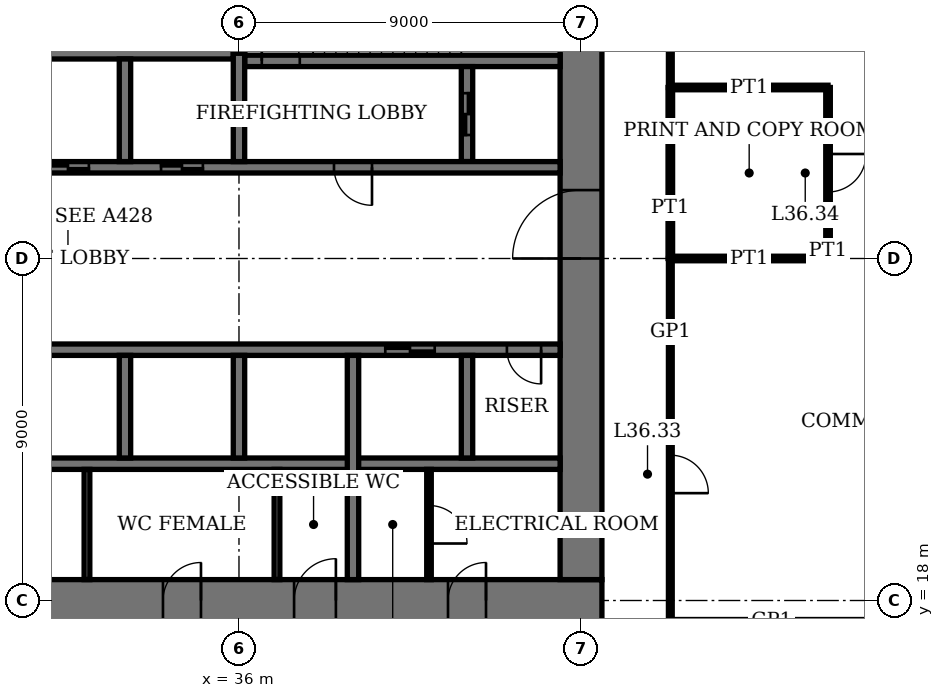
"""IFC4 building model, lengths in metres.
Left out: names, types, materials, properties, quantities, classifications, styles, units other than length and angle.
Written with IfcOpenShell. Run it as: python <this file> out.ifc"""

import sys

from ifc_helpers import new_model, si_unit, direction, frame, frame_2d, origin, place, context, subcontext, project, spatial, rectangle, extrude, element, fill, save


model = new_model("IFC4")
c1 = context("Model", 3, precision=1e-05, world=origin(), true_north=direction((0.0, 1.0)))
c2 = subcontext(c1, "Body", "Model", "MODEL_VIEW")
j1 = project(units=[si_unit("LENGTHUNIT", "METRE"), si_unit("PLANEANGLEUNIT", "RADIAN")], contexts=[c1])
p1 = place(None, origin())
s1 = spatial("IfcSite", under=j1, at=p1, CompositionType="ELEMENT")
p2 = place(p1, origin())
s2 = spatial("IfcBuilding", under=s1, at=p2, CompositionType="ELEMENT")
p3 = place(p2, frame((0.0, 0.0, 149.0)))
s3 = spatial("IfcBuildingStorey", under=s2, at=p3, CompositionType="ELEMENT", Elevation=149.0)
p4 = place(p3, frame((17.45, 18.0, 0.0), z_axis=(0.0, 0.0, 1.0), x_axis=(1.0, 0.0, 0.0)))
e1 = element("IfcWall", 1, at=p4, inside=s3, PredefinedType="SHEAR", context=c2, shape_type="SweptSolid", body=[
    extrude(rectangle(XDim=28.1, YDim=1.1, at=frame_2d((14.05, 0.0))), origin(), (0.0, 0.0, 1.0), 4.0),
])
p5 = place(p4, frame((11.55, 0.0, 0.0)))
e2 = element("IfcOpeningElement", 2, at=p5, cuts=e1, PredefinedType="OPENING", context=c2, shape_type="SweptSolid", body=[
    extrude(rectangle(XDim=1.0, YDim=2.4, at=frame_2d((0.5, 1.2))), frame((0.0, 0.56, 0.0), z_axis=(0.0, -1.0, 0.0), x_axis=(1.0, 0.0, 0.0)), (0.0, 0.0, 1.0), 1.12),
])
p6 = place(p4, frame((16.55, 0.0, 0.0)))
e3 = element("IfcOpeningElement", 3, at=p6, cuts=e1, PredefinedType="OPENING", context=c2, shape_type="SweptSolid", body=[
    extrude(rectangle(XDim=1.0, YDim=2.4, at=frame_2d((0.5, 1.2))), frame((0.0, 0.56, 0.0), z_axis=(0.0, -1.0, 0.0), x_axis=(1.0, 0.0, 0.0)), (0.0, 0.0, 1.0), 1.12),
])
p7 = place(p4, frame((20.0, 0.0, 0.0)))
e4 = element("IfcOpeningElement", 4, at=p7, cuts=e1, PredefinedType="OPENING", context=c2, shape_type="SweptSolid", body=[
    extrude(rectangle(XDim=1.1, YDim=2.4, at=frame_2d((0.55, 1.2))), frame((0.0, 0.56, 0.0), z_axis=(0.0, -1.0, 0.0), x_axis=(1.0, 0.0, 0.0)), (0.0, 0.0, 1.0), 1.12),
])
p8 = place(p4, frame((24.05, 0.0, 0.0)))
e5 = element("IfcOpeningElement", 5, at=p8, cuts=e1, PredefinedType="OPENING", context=c2, shape_type="SweptSolid", body=[
    extrude(rectangle(XDim=1.0, YDim=2.4, at=frame_2d((0.5, 1.2))), frame((0.0, 0.56, 0.0), z_axis=(0.0, -1.0, 0.0), x_axis=(1.0, 0.0, 0.0)), (0.0, 0.0, 1.0), 1.12),
])
p9 = place(p3, frame((45.0, 18.55, 0.0), z_axis=(0.0, 0.0, 1.0), x_axis=(0.0, 1.0, 0.0)))
e6 = element("IfcWall", 6, at=p9, inside=s3, PredefinedType="SHEAR", context=c2, shape_type="SweptSolid", body=[
    extrude(rectangle(XDim=16.9, YDim=1.1, at=frame_2d((8.45, 0.0))), origin(), (0.0, 0.0, 1.0), 4.0),
])
p10 = place(p9, frame((8.45, 0.0, 0.0)))
e7 = element("IfcOpeningElement", 7, at=p10, cuts=e6, PredefinedType="OPENING", context=c2, shape_type="SweptSolid", body=[
    extrude(rectangle(XDim=1.8, YDim=2.4, at=frame_2d((0.9, 1.2))), frame((0.0, 0.56, 0.0), z_axis=(0.0, -1.0, 0.0), x_axis=(1.0, 0.0, 0.0)), (0.0, 0.0, 1.0), 1.12),
])
p11 = place(p3, frame((36.15, 32.2, 0.0), z_axis=(0.0, 0.0, 1.0), x_axis=(1.0, 0.0, 0.0)))
e8 = element("IfcWall", 8, at=p11, inside=s3, PredefinedType="SHEAR", context=c2, shape_type="SweptSolid", body=[
    extrude(rectangle(XDim=8.3, YDim=0.3, at=frame_2d((4.15, 0.0))), origin(), (0.0, 0.0, 1.0), 4.0),
])
p12 = place(p11, frame((0.45, 0.0, 0.0)))
e9 = element("IfcOpeningElement", 9, at=p12, cuts=e8, PredefinedType="OPENING", context=c2, shape_type="SweptSolid", body=[
    extrude(rectangle(XDim=1.0, YDim=2.4, at=frame_2d((0.5, 1.2))), frame((0.0, 0.16, 0.0), z_axis=(0.0, -1.0, 0.0), x_axis=(1.0, 0.0, 0.0)), (0.0, 0.0, 1.0), 0.32),
])
p13 = place(p3, frame((36.0, 32.4, 0.0), z_axis=(0.0, 0.0, 1.0), x_axis=(0.0, 1.0, 0.0)))
e10 = element("IfcWall", 10, at=p13, inside=s3, PredefinedType="SHEAR", context=c2, shape_type="SweptSolid", body=[
    extrude(rectangle(XDim=3.05, YDim=0.3, at=frame_2d((1.525, 0.0))), origin(), (0.0, 0.0, 1.0), 4.0),
])
p14 = place(p3, frame((42.0, 29.55, 0.0), z_axis=(0.0, 0.0, 1.0), x_axis=(0.0, 1.0, 0.0)))
e11 = element("IfcWall", 11, at=p14, inside=s3, PredefinedType="SHEAR", context=c2, shape_type="SweptSolid", body=[
    extrude(rectangle(XDim=2.5, YDim=0.3, at=frame_2d((1.25, 0.0))), origin(), (0.0, 0.0, 1.0), 4.0),
])
p15 = place(p14, frame((0.7, 0.0, 0.0)))
e12 = element("IfcOpeningElement", 12, at=p15, cuts=e11, PredefinedType="OPENING", context=c2, shape_type="SweptSolid", body=[
    extrude(rectangle(XDim=1.1, YDim=2.4, at=frame_2d((0.55, 1.2))), frame((0.0, 0.16, 0.0), z_axis=(0.0, -1.0, 0.0), x_axis=(1.0, 0.0, 0.0)), (0.0, 0.0, 1.0), 0.32),
])
p16 = place(p3, frame((18.55, 24.6, 0.0), z_axis=(0.0, 0.0, 1.0), x_axis=(1.0, 0.0, 0.0)))
e13 = element("IfcWall", 13, at=p16, inside=s3, PredefinedType="SHEAR", context=c2, shape_type="SweptSolid", body=[
    extrude(rectangle(XDim=25.9, YDim=0.3, at=frame_2d((12.95, 0.0))), origin(), (0.0, 0.0, 1.0), 4.0),
])
p17 = place(p16, frame((4.95, 0.0, 0.0)))
e14 = element("IfcOpeningElement", 14, at=p17, cuts=e13, PredefinedType="OPENING", context=c2, shape_type="SweptSolid", body=[
    extrude(rectangle(XDim=1.0, YDim=2.4, at=frame_2d((0.5, 1.2))), frame((0.0, 0.16, 0.0), z_axis=(0.0, -1.0, 0.0), x_axis=(1.0, 0.0, 0.0)), (0.0, 0.0, 1.0), 0.32),
])
p18 = place(p16, frame((24.5, 0.0, 0.0)))
e15 = element("IfcOpeningElement", 15, at=p18, cuts=e13, PredefinedType="OPENING", context=c2, shape_type="SweptSolid", body=[
    extrude(rectangle(XDim=0.9, YDim=2.1, at=frame_2d((0.45, 1.05))), frame((0.0, 0.16, 0.0), z_axis=(0.0, -1.0, 0.0), x_axis=(1.0, 0.0, 0.0)), (0.0, 0.0, 1.0), 0.32),
])
p19 = place(p16, frame((21.3, 0.0, 0.0)))
e16 = element("IfcOpeningElement", 16, at=p19, cuts=e13, PredefinedType="OPENING", context=c2, shape_type="SweptSolid", body=[
    extrude(rectangle(XDim=1.3, YDim=2.4, at=frame_2d((0.65, 1.2))), frame((0.0, 0.16, 0.0), z_axis=(0.0, -1.0, 0.0), x_axis=(1.0, 0.0, 0.0)), (0.0, 0.0, 1.0), 0.32),
])
p20 = place(p3, frame((18.55, 29.4, 0.0), z_axis=(0.0, 0.0, 1.0), x_axis=(1.0, 0.0, 0.0)))
e17 = element("IfcWall", 17, at=p20, inside=s3, PredefinedType="SHEAR", context=c2, shape_type="SweptSolid", body=[
    extrude(rectangle(XDim=25.9, YDim=0.3, at=frame_2d((12.95, 0.0))), origin(), (0.0, 0.0, 1.0), 4.0),
])
p21 = place(p20, frame((19.95, 0.0, 0.0)))
e18 = element("IfcOpeningElement", 18, at=p21, cuts=e17, PredefinedType="OPENING", context=c2, shape_type="SweptSolid", body=[
    extrude(rectangle(XDim=1.0, YDim=2.4, at=frame_2d((0.5, 1.2))), frame((0.0, 0.16, 0.0), z_axis=(0.0, -1.0, 0.0), x_axis=(1.0, 0.0, 0.0)), (0.0, 0.0, 1.0), 0.32),
])
p22 = place(p20, frame((0.5, 0.0, 0.0)))
e19 = element("IfcOpeningElement", 19, at=p22, cuts=e17, PredefinedType="OPENING", context=c2, shape_type="SweptSolid", body=[
    extrude(rectangle(XDim=0.9, YDim=2.1, at=frame_2d((0.45, 1.05))), frame((0.0, 0.16, 0.0), z_axis=(0.0, -1.0, 0.0), x_axis=(1.0, 0.0, 0.0)), (0.0, 0.0, 1.0), 0.32),
])
p23 = place(p20, frame((15.4, 0.0, 0.0)))
e20 = element("IfcOpeningElement", 20, at=p23, cuts=e17, PredefinedType="OPENING", context=c2, shape_type="SweptSolid", body=[
    extrude(rectangle(XDim=1.1, YDim=2.4, at=frame_2d((0.55, 1.2))), frame((0.0, 0.16, 0.0), z_axis=(0.0, -1.0, 0.0), x_axis=(1.0, 0.0, 0.0)), (0.0, 0.0, 1.0), 0.32),
])
p24 = place(p20, frame((12.4, 0.0, 0.0)))
e21 = element("IfcOpeningElement", 21, at=p24, cuts=e17, PredefinedType="OPENING", context=c2, shape_type="SweptSolid", body=[
    extrude(rectangle(XDim=1.1, YDim=2.4, at=frame_2d((0.55, 1.2))), frame((0.0, 0.16, 0.0), z_axis=(0.0, -1.0, 0.0), x_axis=(1.0, 0.0, 0.0)), (0.0, 0.0, 1.0), 0.32),
])
p25 = place(p20, frame((3.3, 0.0, 0.0)))
e22 = element("IfcOpeningElement", 22, at=p25, cuts=e17, PredefinedType="OPENING", context=c2, shape_type="SweptSolid", body=[
    extrude(rectangle(XDim=1.3, YDim=2.4, at=frame_2d((0.65, 1.2))), frame((0.0, 0.16, 0.0), z_axis=(0.0, -1.0, 0.0), x_axis=(1.0, 0.0, 0.0)), (0.0, 0.0, 1.0), 0.32),
])
for number, where, z_axis, x_axis in (
    (23, (27.15, 21.6, 0.0), (0.0, 0.0, 1.0), (1.0, 0.0, 0.0)),
    (24, (18.55, 32.4, 0.0), (0.0, 0.0, 1.0), (1.0, 0.0, 0.0)),
):
    element("IfcWall", number, at=place(p3, frame(where, z_axis=z_axis, x_axis=x_axis)), inside=s3, PredefinedType="SHEAR", context=c2, shape_type="SweptSolid", body=[
        extrude(rectangle(XDim=17.3, YDim=0.3, at=frame_2d((8.65, 0.0))), origin(), (0.0, 0.0, 1.0), 4.0),
    ])
for number, where, z_axis, x_axis in (
    (25, (33.0, 29.55, 0.0), (0.0, 0.0, 1.0), (0.0, 1.0, 0.0)),
    (26, (33.0, 21.75, 0.0), (0.0, 0.0, 1.0), (0.0, 1.0, 0.0)),
    (27, (36.0, 21.75, 0.0), (0.0, 0.0, 1.0), (0.0, 1.0, 0.0)),
):
    element("IfcWall", number, at=place(p3, frame(where, z_axis=z_axis, x_axis=x_axis)), inside=s3, PredefinedType="SHEAR", context=c2, shape_type="SweptSolid", body=[
        extrude(rectangle(XDim=2.7, YDim=0.3, at=frame_2d((1.35, 0.0))), origin(), (0.0, 0.0, 1.0), 4.0),
    ])
p26 = place(p3, frame((39.0, 18.55, 0.0), z_axis=(0.0, 0.0, 1.0), x_axis=(0.0, 1.0, 0.0)))
e28 = element("IfcWall", 28, at=p26, inside=s3, PredefinedType="SHEAR", context=c2, shape_type="SweptSolid", body=[
    extrude(rectangle(XDim=5.9, YDim=0.3, at=frame_2d((2.95, 0.0))), origin(), (0.0, 0.0, 1.0), 4.0),
])
p27 = place(p3, frame((42.0, 21.75, 0.0), z_axis=(0.0, 0.0, 1.0), x_axis=(0.0, 1.0, 0.0)))
e29 = element("IfcWall", 29, at=p27, inside=s3, PredefinedType="SHEAR", context=c2, shape_type="SweptSolid", body=[
    extrude(rectangle(XDim=2.7, YDim=0.3, at=frame_2d((1.35, 0.0))), origin(), (0.0, 0.0, 1.0), 4.0),
])
p28 = place(p3, frame((36.0, 29.55, 0.0), z_axis=(0.0, 0.0, 1.0), x_axis=(0.0, 1.0, 0.0)))
e30 = element("IfcWall", 30, at=p28, inside=s3, PredefinedType="SHEAR", context=c2, shape_type="SweptSolid", body=[
    extrude(rectangle(XDim=2.85, YDim=0.3, at=frame_2d((1.425, 0.0))), origin(), (0.0, 0.0, 1.0), 4.0),
])
p29 = place(p3, frame((47.35, 27.0, 0.0), z_axis=(0.0, 0.0, 1.0), x_axis=(1.0, 0.0, 0.0)))
e31 = element("IfcWall", 31, at=p29, inside=s3, PredefinedType="PARTITIONING", context=c2, shape_type="SweptSolid", body=[
    extrude(rectangle(XDim=4.15, YDim=0.12, at=frame_2d((2.075, 0.0))), origin(), (0.0, 0.0, 1.0), 3.05),
])
p30 = place(p3, frame((47.35, 31.5, 0.0), z_axis=(0.0, 0.0, 1.0), x_axis=(1.0, 0.0, 0.0)))
e32 = element("IfcWall", 32, at=p30, inside=s3, PredefinedType="PARTITIONING", context=c2, shape_type="SweptSolid", body=[
    extrude(rectangle(XDim=4.15, YDim=0.12, at=frame_2d((2.075, 0.0))), origin(), (0.0, 0.0, 1.0), 3.1),
])
p31 = place(p3, frame((47.35, 27.0, 0.0), z_axis=(0.0, 0.0, 1.0), x_axis=(0.0, 1.0, 0.0)))
e33 = element("IfcWall", 33, at=p31, inside=s3, PredefinedType="PARTITIONING", context=c2, shape_type="SweptSolid", body=[
    extrude(rectangle(XDim=4.5, YDim=0.12, at=frame_2d((2.25, 0.0))), origin(), (0.0, 0.0, 1.0), 3.75),
])
p32 = place(p3, frame((47.35, 15.65, 0.0), z_axis=(0.0, 0.0, 1.0), x_axis=(0.0, 1.0, 0.0)))
e34 = element("IfcWall", 34, at=p32, inside=s3, PredefinedType="PARTITIONING", context=c2, shape_type="SweptSolid", body=[
    extrude(rectangle(XDim=11.35, YDim=0.1, at=frame_2d((5.675, 0.0))), origin(), (0.0, 0.0, 1.0), 3.75),
])
p33 = place(p32, frame((5.175, 0.0, 0.0)))
e35 = element("IfcOpeningElement", 35, at=p33, cuts=e34, PredefinedType="OPENING", context=c2, shape_type="SweptSolid", body=[
    extrude(rectangle(XDim=1.0, YDim=2.4, at=frame_2d((0.5, 1.2))), frame((0.0, 0.06, 0.0), z_axis=(0.0, -1.0, 0.0), x_axis=(1.0, 0.0, 0.0)), (0.0, 0.0, 1.0), 0.12),
])
p34 = place(p3, frame((47.35, 31.5, 0.0), z_axis=(0.0, 0.0, 1.0), x_axis=(0.0, 1.0, 0.0)))
e36 = element("IfcWall", 36, at=p34, inside=s3, PredefinedType="PARTITIONING", context=c2, shape_type="SweptSolid", body=[
    extrude(rectangle(XDim=5.05, YDim=0.1, at=frame_2d((2.525, 0.0))), origin(), (0.0, 0.0, 1.0), 3.75),
])
p35 = place(p3, frame((51.5, 27.0, 0.0), z_axis=(0.0, 0.0, 1.0), x_axis=(0.0, 1.0, 0.0)))
e37 = element("IfcWall", 37, at=p35, inside=s3, PredefinedType="PARTITIONING", context=c2, shape_type="SweptSolid", body=[
    extrude(rectangle(XDim=4.5, YDim=0.12, at=frame_2d((2.25, 0.0))), origin(), (0.0, 0.0, 1.0), 3.75),
])
p36 = place(p35, frame((1.75, 0.0, 0.0)))
e38 = element("IfcOpeningElement", 38, at=p36, cuts=e37, PredefinedType="OPENING", context=c2, shape_type="SweptSolid", body=[
    extrude(rectangle(XDim=1.0, YDim=2.4, at=frame_2d((0.5, 1.2))), frame((0.0, 0.07, 0.0), z_axis=(0.0, -1.0, 0.0), x_axis=(1.0, 0.0, 0.0)), (0.0, 0.0, 1.0), 0.14),
])
for number, where, z_axis, x_axis in (
    (39, (32.0, 18.55, 0.0), (0.0, 0.0, 1.0), (0.0, 1.0, 0.0)),
    (40, (37.0, 18.55, 0.0), (0.0, 0.0, 1.0), (0.0, 1.0, 0.0)),
):
    element("IfcWall", number, at=place(p3, frame(where, z_axis=z_axis, x_axis=x_axis)), inside=s3, PredefinedType="PARTITIONING", context=c2, shape_type="SweptSolid", body=[
        extrude(rectangle(XDim=2.9, YDim=0.15, at=frame_2d((1.45, 0.0))), origin(), (0.0, 0.0, 1.0), 3.75),
    ])
p37 = place(p3, frame((41.0, 18.55, 0.0), z_axis=(0.0, 0.0, 1.0), x_axis=(0.0, 1.0, 0.0)))
e41 = element("IfcWall", 41, at=p37, inside=s3, PredefinedType="PARTITIONING", context=c2, shape_type="SweptSolid", body=[
    extrude(rectangle(XDim=2.9, YDim=0.12, at=frame_2d((1.45, 0.0))), origin(), (0.0, 0.0, 1.0), 3.75),
])
p38 = place(p37, frame((0.95, 0.0, 0.0)))
e42 = element("IfcOpeningElement", 42, at=p38, cuts=e41, PredefinedType="OPENING", context=c2, shape_type="SweptSolid", body=[
    extrude(rectangle(XDim=1.0, YDim=2.4, at=frame_2d((0.5, 1.2))), frame((0.0, 0.07, 0.0), z_axis=(0.0, -1.0, 0.0), x_axis=(1.0, 0.0, 0.0)), (0.0, 0.0, 1.0), 0.14),
])
p39 = place(p10, origin())
e43 = element("IfcDoor", 43, at=p39, inside=s3, OperationType="DOUBLE_DOOR_DOUBLE_SWING", PredefinedType="DOOR", context=c2, shape_type="SweptSolid", body=[
    extrude(rectangle(XDim=1.8, YDim=2.4, at=frame_2d((0.9, 1.2))), frame((0.0, 0.03, 0.0), z_axis=(0.0, -1.0, 0.0), x_axis=(1.0, 0.0, 0.0)), (0.0, 0.0, 1.0), 0.06),
    extrude(rectangle(XDim=0.04, YDim=2.4, at=frame_2d((0.02, 1.2))), frame((0.0, 0.55, 0.0), z_axis=(0.0, -1.0, 0.0), x_axis=(1.0, 0.0, 0.0)), (0.0, 0.0, 1.0), 1.1),
    extrude(rectangle(XDim=0.04, YDim=2.4, at=frame_2d((1.78, 1.2))), frame((0.0, 0.55, 0.0), z_axis=(0.0, -1.0, 0.0), x_axis=(1.0, 0.0, 0.0)), (0.0, 0.0, 1.0), 1.1),
    extrude(rectangle(XDim=1.8, YDim=0.04, at=frame_2d((0.9, 2.38))), frame((0.0, 0.55, 0.0), z_axis=(0.0, -1.0, 0.0), x_axis=(1.0, 0.0, 0.0)), (0.0, 0.0, 1.0), 1.1),
])
fill(e7, e43)
p40 = place(p6, origin())
e44 = element("IfcDoor", 44, at=p40, inside=s3, OperationType="SINGLE_SWING_LEFT", PredefinedType="DOOR", context=c2, shape_type="SweptSolid", body=[
    extrude(rectangle(XDim=1.0, YDim=2.4, at=frame_2d((0.5, 1.2))), frame((0.0, 0.025, 0.0), z_axis=(0.0, -1.0, 0.0), x_axis=(1.0, 0.0, 0.0)), (0.0, 0.0, 1.0), 0.05),
    extrude(rectangle(XDim=0.04, YDim=2.4, at=frame_2d((0.02, 1.2))), frame((0.0, 0.4, 0.0), z_axis=(0.0, -1.0, 0.0), x_axis=(1.0, 0.0, 0.0)), (0.0, 0.0, 1.0), 0.8),
    extrude(rectangle(XDim=0.04, YDim=2.4, at=frame_2d((0.98, 1.2))), frame((0.0, 0.4, 0.0), z_axis=(0.0, -1.0, 0.0), x_axis=(1.0, 0.0, 0.0)), (0.0, 0.0, 1.0), 0.8),
    extrude(rectangle(XDim=1.0, YDim=0.04, at=frame_2d((0.5, 2.38))), frame((0.0, 0.4, 0.0), z_axis=(0.0, -1.0, 0.0), x_axis=(1.0, 0.0, 0.0)), (0.0, 0.0, 1.0), 0.8),
])
fill(e3, e44)
p41 = place(p7, origin())
e45 = element("IfcDoor", 45, at=p41, inside=s3, OperationType="SINGLE_SWING_LEFT", PredefinedType="DOOR", context=c2, shape_type="SweptSolid", body=[
    extrude(rectangle(XDim=1.1, YDim=2.4, at=frame_2d((0.55, 1.2))), frame((0.0, 0.025, 0.0), z_axis=(0.0, -1.0, 0.0), x_axis=(1.0, 0.0, 0.0)), (0.0, 0.0, 1.0), 0.05),
    extrude(rectangle(XDim=0.04, YDim=2.4, at=frame_2d((0.02, 1.2))), frame((0.0, 0.44, 0.0), z_axis=(0.0, -1.0, 0.0), x_axis=(1.0, 0.0, 0.0)), (0.0, 0.0, 1.0), 0.88),
    extrude(rectangle(XDim=0.04, YDim=2.4, at=frame_2d((1.08, 1.2))), frame((0.0, 0.44, 0.0), z_axis=(0.0, -1.0, 0.0), x_axis=(1.0, 0.0, 0.0)), (0.0, 0.0, 1.0), 0.88),
    extrude(rectangle(XDim=1.1, YDim=0.04, at=frame_2d((0.55, 2.38))), frame((0.0, 0.44, 0.0), z_axis=(0.0, -1.0, 0.0), x_axis=(1.0, 0.0, 0.0)), (0.0, 0.0, 1.0), 0.88),
])
fill(e4, e45)
p42 = place(p8, origin())
e46 = element("IfcDoor", 46, at=p42, inside=s3, OperationType="SINGLE_SWING_LEFT", PredefinedType="DOOR", context=c2, shape_type="SweptSolid", body=[
    extrude(rectangle(XDim=1.0, YDim=2.4, at=frame_2d((0.5, 1.2))), frame((0.0, 0.025, 0.0), z_axis=(0.0, -1.0, 0.0), x_axis=(1.0, 0.0, 0.0)), (0.0, 0.0, 1.0), 0.05),
    extrude(rectangle(XDim=0.04, YDim=2.4, at=frame_2d((0.02, 1.2))), frame((0.0, 0.4, 0.0), z_axis=(0.0, -1.0, 0.0), x_axis=(1.0, 0.0, 0.0)), (0.0, 0.0, 1.0), 0.8),
    extrude(rectangle(XDim=0.04, YDim=2.4, at=frame_2d((0.98, 1.2))), frame((0.0, 0.4, 0.0), z_axis=(0.0, -1.0, 0.0), x_axis=(1.0, 0.0, 0.0)), (0.0, 0.0, 1.0), 0.8),
    extrude(rectangle(XDim=1.0, YDim=0.04, at=frame_2d((0.5, 2.38))), frame((0.0, 0.4, 0.0), z_axis=(0.0, -1.0, 0.0), x_axis=(1.0, 0.0, 0.0)), (0.0, 0.0, 1.0), 0.8),
])
fill(e5, e46)
p43 = place(p12, origin())
e47 = element("IfcDoor", 47, at=p43, inside=s3, OperationType="SINGLE_SWING_RIGHT", PredefinedType="DOOR", context=c2, shape_type="SweptSolid", body=[
    extrude(rectangle(XDim=1.0, YDim=2.4, at=frame_2d((0.5, 1.2))), frame((0.0, 0.03, 0.0), z_axis=(0.0, -1.0, 0.0), x_axis=(1.0, 0.0, 0.0)), (0.0, 0.0, 1.0), 0.06),
])
fill(e9, e47)
p44 = place(p21, origin())
e48 = element("IfcDoor", 48, at=p44, inside=s3, OperationType="SINGLE_SWING_RIGHT", PredefinedType="DOOR", context=c2, shape_type="SweptSolid", body=[
    extrude(rectangle(XDim=1.0, YDim=2.4, at=frame_2d((0.5, 1.2))), frame((0.0, 0.03, 0.0), z_axis=(0.0, -1.0, 0.0), x_axis=(1.0, 0.0, 0.0)), (0.0, 0.0, 1.0), 0.06),
])
fill(e18, e48)
p45 = place(p18, origin())
e49 = element("IfcDoor", 49, at=p45, inside=s3, OperationType="SINGLE_SWING_RIGHT", PredefinedType="DOOR", context=c2, shape_type="SweptSolid", body=[
    extrude(rectangle(XDim=0.9, YDim=2.1, at=frame_2d((0.45, 1.05))), frame((0.0, 0.03, 0.0), z_axis=(0.0, -1.0, 0.0), x_axis=(1.0, 0.0, 0.0)), (0.0, 0.0, 1.0), 0.06),
])
fill(e15, e49)
p46 = place(p33, origin())
e50 = element("IfcDoor", 50, at=p46, inside=s3, OperationType="SINGLE_SWING_LEFT", PredefinedType="DOOR", context=c2, shape_type="SweptSolid", body=[
    extrude(rectangle(XDim=1.0, YDim=2.4, at=frame_2d((0.5, 1.2))), frame((0.0, 0.02, 0.0), z_axis=(0.0, -1.0, 0.0), x_axis=(1.0, 0.0, 0.0)), (0.0, 0.0, 1.0), 0.04),
])
fill(e35, e50)
p47 = place(p36, origin())
e51 = element("IfcDoor", 51, at=p47, inside=s3, OperationType="SINGLE_SWING_RIGHT", PredefinedType="DOOR", context=c2, shape_type="SweptSolid", body=[
    extrude(rectangle(XDim=1.0, YDim=2.4, at=frame_2d((0.5, 1.2))), frame((0.0, 0.025, 0.0), z_axis=(0.0, -1.0, 0.0), x_axis=(1.0, 0.0, 0.0)), (0.0, 0.0, 1.0), 0.05),
])
fill(e38, e51)
p48 = place(p38, origin())
e52 = element("IfcDoor", 52, at=p48, inside=s3, OperationType="SINGLE_SWING_LEFT", PredefinedType="DOOR", context=c2, shape_type="SweptSolid", body=[
    extrude(rectangle(XDim=1.0, YDim=2.4, at=frame_2d((0.5, 1.2))), frame((0.0, 0.03, 0.0), z_axis=(0.0, -1.0, 0.0), x_axis=(1.0, 0.0, 0.0)), (0.0, 0.0, 1.0), 0.06),
])
fill(e42, e52)
p49 = place(p23, origin())
e53 = element("IfcDoor", 53, at=p49, inside=s3, OperationType="DOUBLE_DOOR_SLIDING", PredefinedType="DOOR", context=c2, shape_type="SweptSolid", body=[
    extrude(rectangle(XDim=1.1, YDim=2.4, at=frame_2d((0.55, 1.2))), frame((0.0, 0.02, 0.0), z_axis=(0.0, -1.0, 0.0), x_axis=(1.0, 0.0, 0.0)), (0.0, 0.0, 1.0), 0.04),
])
fill(e20, e53)
p50 = place(p24, origin())
e54 = element("IfcDoor", 54, at=p50, inside=s3, OperationType="DOUBLE_DOOR_SLIDING", PredefinedType="DOOR", context=c2, shape_type="SweptSolid", body=[
    extrude(rectangle(XDim=1.1, YDim=2.4, at=frame_2d((0.55, 1.2))), frame((0.0, 0.02, 0.0), z_axis=(0.0, -1.0, 0.0), x_axis=(1.0, 0.0, 0.0)), (0.0, 0.0, 1.0), 0.04),
])
fill(e21, e54)
p51 = place(p19, origin())
e55 = element("IfcDoor", 55, at=p51, inside=s3, OperationType="DOUBLE_DOOR_SLIDING", PredefinedType="DOOR", context=c2, shape_type="SweptSolid", body=[
    extrude(rectangle(XDim=1.3, YDim=2.4, at=frame_2d((0.65, 1.2))), frame((0.0, 0.02, 0.0), z_axis=(0.0, -1.0, 0.0), x_axis=(1.0, 0.0, 0.0)), (0.0, 0.0, 1.0), 0.04),
])
fill(e16, e55)
p52 = place(p15, origin())
e56 = element("IfcDoor", 56, at=p52, inside=s3, OperationType="DOUBLE_DOOR_SLIDING", PredefinedType="DOOR", context=c2, shape_type="SweptSolid", body=[
    extrude(rectangle(XDim=1.1, YDim=2.4, at=frame_2d((0.55, 1.2))), frame((0.0, 0.03, 0.0), z_axis=(0.0, -1.0, 0.0), x_axis=(1.0, 0.0, 0.0)), (0.0, 0.0, 1.0), 0.06),
])
fill(e12, e56)
save(model, sys.argv[1])
